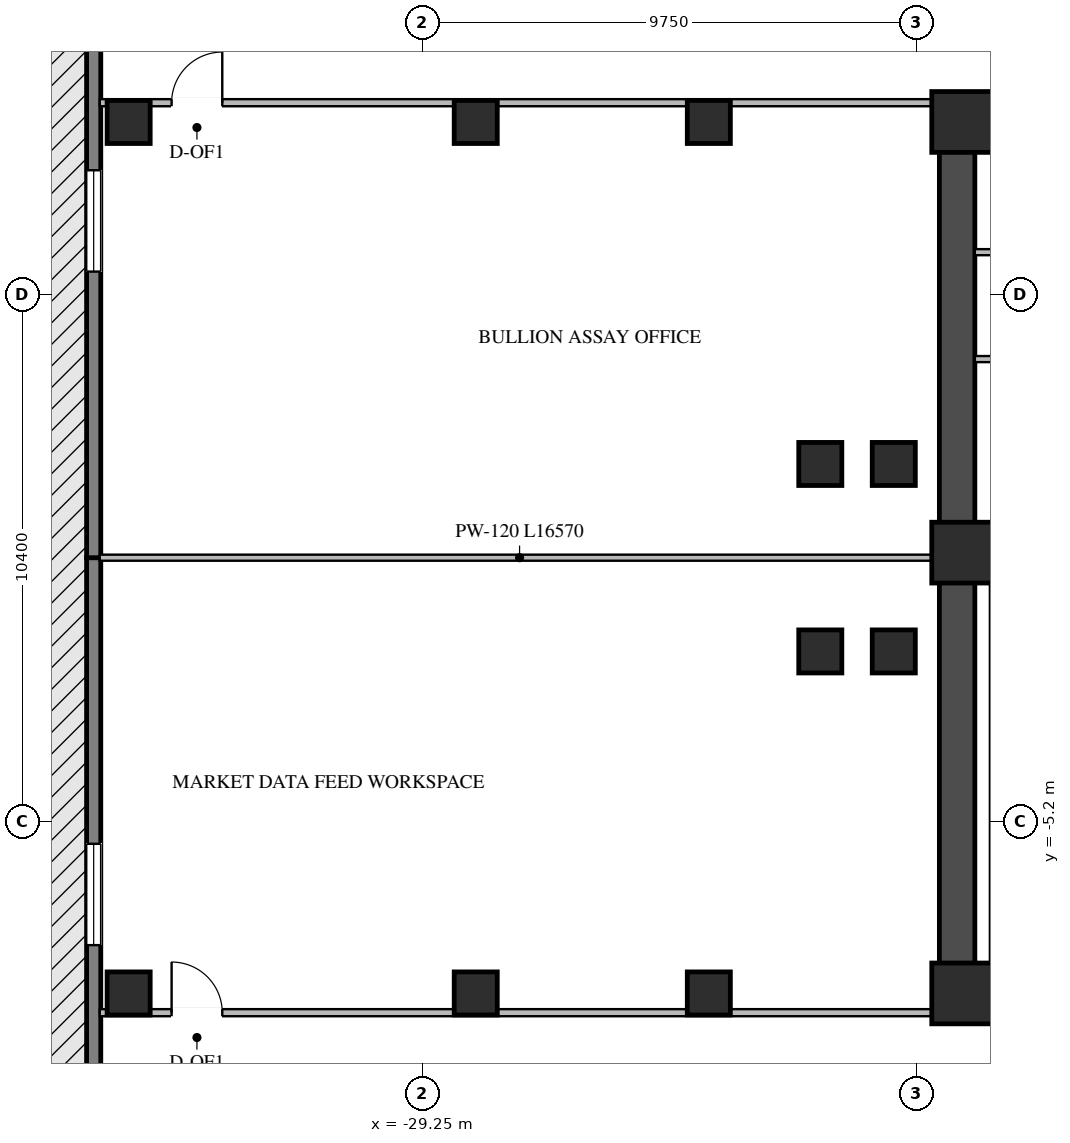
"""IFC4 building model, lengths in metres.
Left out: names, types, materials, properties, quantities, classifications, styles, units other than length and angle.
Written with IfcOpenShell. Run it as: python <this file> out.ifc"""

import sys

from ifc_helpers import new_model, si_unit, direction, frame, frame_2d, origin, origin_2d, place, context, subcontext, project, spatial, rectangle, i_section, extrude, element, fill, save


model = new_model("IFC4")
c1 = context("Model", 3, precision=1e-05, world=origin(), true_north=direction((0.0, 1.0)))
c2 = subcontext(c1, "Body", "Model", "MODEL_VIEW")
j1 = project(units=[si_unit("LENGTHUNIT", "METRE"), si_unit("PLANEANGLEUNIT", "RADIAN")], contexts=[c1])
p1 = place(None, origin())
s1 = spatial("IfcSite", under=j1, at=p1, CompositionType="ELEMENT")
p2 = place(p1, origin())
s2 = spatial("IfcBuilding", under=s1, at=p2, CompositionType="ELEMENT")
p3 = place(p2, frame((0.0, 0.0, 27.0)))
s3 = spatial("IfcBuildingStorey", under=s2, at=p3, CompositionType="ELEMENT", Elevation=27.0)
p4 = place(p3, frame((-19.05, -8.7, 0.0), z_axis=(0.0, 0.0, 1.0), x_axis=(1.0, 0.0, 0.0)))
e1 = element("IfcWall", 1, at=p4, inside=s3, PredefinedType="SHEAR", context=c2, shape_type="SweptSolid", body=[
    extrude(rectangle(XDim=10.25, YDim=0.7, at=frame_2d((5.125, 0.0))), origin(), (0.0, 0.0, 1.0), 4.02),
])
p5 = place(p3, frame((-19.05, 8.7, 0.0), z_axis=(0.0, 0.0, 1.0), x_axis=(1.0, 0.0, 0.0)))
e2 = element("IfcWall", 2, at=p5, inside=s3, PredefinedType="SHEAR", context=c2, shape_type="SweptSolid", body=[
    extrude(rectangle(XDim=10.25, YDim=0.7, at=frame_2d((5.125, 0.0))), origin(), (0.0, 0.0, 1.0), 4.02),
])
p6 = place(p5, frame((5.6, 0.0, 0.0)))
e3 = element("IfcOpeningElement", 3, at=p6, cuts=e2, PredefinedType="OPENING", context=c2, shape_type="SweptSolid", body=[
    extrude(rectangle(XDim=1.4, YDim=2.05, at=frame_2d((0.7, 1.025))), frame((0.0, 0.36, 0.0), z_axis=(0.0, -1.0, 0.0), x_axis=(1.0, 0.0, 0.0)), (0.0, 0.0, 1.0), 0.72),
])
p7 = place(p3, frame((-18.7, -8.35, 0.0), z_axis=(0.0, 0.0, 1.0), x_axis=(0.0, 1.0, 0.0)))
e4 = element("IfcWall", 4, at=p7, inside=s3, PredefinedType="SHEAR", context=c2, shape_type="SweptSolid", body=[
    extrude(rectangle(XDim=16.7, YDim=0.7, at=frame_2d((8.35, 0.0))), origin(), (0.0, 0.0, 1.0), 4.02),
])
for number, where, z_axis, x_axis in (
    (5, (-18.6, -8.6, 0.0), (0.0, 0.0, 1.0), (1.0, 0.0, 0.0)),
    (6, (-18.6, 0.1, 0.0), (0.0, 0.0, 1.0), (1.0, 0.0, 0.0)),
    (7, (-18.6, 8.6, 0.0), (0.0, 0.0, 1.0), (1.0, 0.0, 0.0)),
):
    element("IfcColumn", number, at=place(p3, frame(where, z_axis=z_axis, x_axis=x_axis)), inside=s3, PredefinedType="COLUMN", context=c2, shape_type="SweptSolid", body=[
        extrude(rectangle(XDim=1.2, YDim=1.2, at=origin_2d()), origin(), (0.0, 0.0, 1.0), 4.2),
    ])
for number, where, z_axis, x_axis in (
    (8, (-21.4, -1.85, 0.0), (0.0, 0.0, 1.0), (1.0, 0.0, 0.0)),
    (9, (-21.4, 1.85, 0.0), (0.0, 0.0, 1.0), (1.0, 0.0, 0.0)),
    (10, (-19.95, -1.85, 0.0), (0.0, 0.0, 1.0), (1.0, 0.0, 0.0)),
    (11, (-19.95, 1.85, 0.0), (0.0, 0.0, 1.0), (1.0, 0.0, 0.0)),
    (12, (-23.6, -8.6, 0.0), (0.0, 0.0, 1.0), (1.0, 0.0, 0.0)),
    (13, (-23.6, 8.6, 0.0), (0.0, 0.0, 1.0), (1.0, 0.0, 0.0)),
    (14, (-28.2, -8.6, 0.0), (0.0, 0.0, 1.0), (1.0, 0.0, 0.0)),
    (15, (-28.2, 8.6, 0.0), (0.0, 0.0, 1.0), (1.0, 0.0, 0.0)),
    (16, (-35.05, -8.6, 0.0), (0.0, 0.0, 1.0), (1.0, 0.0, 0.0)),
    (17, (-35.05, 8.6, 0.0), (0.0, 0.0, 1.0), (1.0, 0.0, 0.0)),
):
    element("IfcColumn", number, at=place(p3, frame(where, z_axis=z_axis, x_axis=x_axis)), inside=s3, PredefinedType="COLUMN", context=c2, shape_type="SweptSolid", body=[
        extrude(i_section(OverallWidth=0.85, OverallDepth=0.85, WebThickness=0.032, FlangeThickness=0.048, at=origin_2d()), origin(), (0.0, 0.0, 1.0), 4.2),
    ])
p8 = place(p3, frame((-35.74, -19.94, 0.0), z_axis=(0.0, 0.0, 1.0), x_axis=(0.0, 1.0, 0.0)))
e18 = element("IfcWall", 18, at=p8, inside=s3, PredefinedType="STANDARD", context=c2, shape_type="SweptSolid", body=[
    extrude(rectangle(XDim=19.94, YDim=0.28, at=frame_2d((9.97, 0.0))), origin(), (0.0, 0.0, 1.0), 4.0),
])
p9 = place(p8, frame((6.197, 0.0, 0.76)))
e19 = element("IfcOpeningElement", 19, at=p9, cuts=e18, PredefinedType="OPENING", context=c2, shape_type="SweptSolid", body=[
    extrude(rectangle(XDim=2.0, YDim=2.05, at=frame_2d((1.0, 1.025))), frame((0.0, 0.15, 0.0), z_axis=(0.0, -1.0, 0.0), x_axis=(1.0, 0.0, 0.0)), (0.0, 0.0, 1.0), 0.3),
])
p10 = place(p8, frame((12.293, 0.0, 0.76)))
e20 = element("IfcOpeningElement", 20, at=p10, cuts=e18, PredefinedType="OPENING", context=c2, shape_type="SweptSolid", body=[
    extrude(rectangle(XDim=2.0, YDim=2.05, at=frame_2d((1.0, 1.025))), frame((0.0, 0.15, 0.0), z_axis=(0.0, -1.0, 0.0), x_axis=(1.0, 0.0, 0.0)), (0.0, 0.0, 1.0), 0.3),
])
p11 = place(p3, frame((-35.74, 0.0, 0.0), z_axis=(0.0, 0.0, 1.0), x_axis=(0.0, 1.0, 0.0)))
e21 = element("IfcWall", 21, at=p11, inside=s3, PredefinedType="STANDARD", context=c2, shape_type="SweptSolid", body=[
    extrude(rectangle(XDim=19.94, YDim=0.28, at=frame_2d((9.97, 0.0))), origin(), (0.0, 0.0, 1.0), 4.0),
])
p12 = place(p11, frame((5.647, 0.0, 0.76)))
e22 = element("IfcOpeningElement", 22, at=p12, cuts=e21, PredefinedType="OPENING", context=c2, shape_type="SweptSolid", body=[
    extrude(rectangle(XDim=2.0, YDim=2.05, at=frame_2d((1.0, 1.025))), frame((0.0, 0.15, 0.0), z_axis=(0.0, -1.0, 0.0), x_axis=(1.0, 0.0, 0.0)), (0.0, 0.0, 1.0), 0.3),
])
p13 = place(p11, frame((11.743, 0.0, 0.76)))
e23 = element("IfcOpeningElement", 23, at=p13, cuts=e21, PredefinedType="OPENING", context=c2, shape_type="SweptSolid", body=[
    extrude(rectangle(XDim=2.0, YDim=2.05, at=frame_2d((1.0, 1.025))), frame((0.0, 0.15, 0.0), z_axis=(0.0, -1.0, 0.0), x_axis=(1.0, 0.0, 0.0)), (0.0, 0.0, 1.0), 0.3),
])
p14 = place(p3, frame((-18.35, 3.92, 0.0), z_axis=(0.0, 0.0, 1.0), x_axis=(1.0, 0.0, 0.0)))
e24 = element("IfcWall", 24, at=p14, inside=s3, PredefinedType="STANDARD", context=c2, shape_type="SweptSolid", body=[
    extrude(rectangle(XDim=4.45, YDim=0.12, at=frame_2d((2.225, 0.0))), origin(), (0.0, 0.0, 1.0), 4.0),
])
p15 = place(p3, frame((-18.35, 6.03, 0.0), z_axis=(0.0, 0.0, 1.0), x_axis=(1.0, 0.0, 0.0)))
e25 = element("IfcWall", 25, at=p15, inside=s3, PredefinedType="STANDARD", context=c2, shape_type="SweptSolid", body=[
    extrude(rectangle(XDim=2.2, YDim=0.12, at=frame_2d((1.1, 0.0))), origin(), (0.0, 0.0, 1.0), 4.0),
])
p16 = place(p3, frame((-35.62, 8.98, 0.0), z_axis=(0.0, 0.0, 1.0), x_axis=(1.0, 0.0, 0.0)))
e26 = element("IfcWall", 26, at=p16, inside=s3, PredefinedType="STANDARD", context=c2, shape_type="SweptSolid", body=[
    extrude(rectangle(XDim=16.57, YDim=0.14, at=frame_2d((8.285, 0.0))), origin(), (0.0, 0.0, 1.0), 4.0),
])
p17 = place(p16, frame((1.418, 0.0, 0.0)))
e27 = element("IfcOpeningElement", 27, at=p17, cuts=e26, PredefinedType="OPENING", context=c2, shape_type="SweptSolid", body=[
    extrude(rectangle(XDim=1.0, YDim=2.08, at=frame_2d((0.5, 1.04))), frame((0.0, 0.08, 0.0), z_axis=(0.0, -1.0, 0.0), x_axis=(1.0, 0.0, 0.0)), (0.0, 0.0, 1.0), 0.16),
])
p18 = place(p3, frame((-35.62, -8.98, 0.0), z_axis=(0.0, 0.0, 1.0), x_axis=(1.0, 0.0, 0.0)))
e28 = element("IfcWall", 28, at=p18, inside=s3, PredefinedType="STANDARD", context=c2, shape_type="SweptSolid", body=[
    extrude(rectangle(XDim=16.57, YDim=0.14, at=frame_2d((8.285, 0.0))), origin(), (0.0, 0.0, 1.0), 4.0),
])
p19 = place(p18, frame((1.418, 0.0, 0.0)))
e29 = element("IfcOpeningElement", 29, at=p19, cuts=e28, PredefinedType="OPENING", context=c2, shape_type="SweptSolid", body=[
    extrude(rectangle(XDim=1.0, YDim=2.08, at=frame_2d((0.5, 1.04))), frame((0.0, 0.08, 0.0), z_axis=(0.0, -1.0, 0.0), x_axis=(1.0, 0.0, 0.0)), (0.0, 0.0, 1.0), 0.16),
])
p20 = place(p3, frame((-35.62, 0.0, 0.0), z_axis=(0.0, 0.0, 1.0), x_axis=(1.0, 0.0, 0.0)))
e30 = element("IfcWall", 30, at=p20, inside=s3, PredefinedType="STANDARD", context=c2, shape_type="SweptSolid", body=[
    extrude(rectangle(XDim=16.57, YDim=0.12, at=frame_2d((8.285, 0.0))), origin(), (0.0, 0.0, 1.0), 3.495),
])
p21 = place(p10, origin())
e31 = element("IfcWindow", 31, at=p21, inside=s3, PartitioningType="DOUBLE_PANEL_VERTICAL", PredefinedType="WINDOW", context=c2, shape_type="SweptSolid", body=[
    extrude(rectangle(XDim=2.0, YDim=2.05, at=frame_2d((1.0, 1.025))), frame((0.0, 0.03, 0.0), z_axis=(0.0, -1.0, 0.0), x_axis=(1.0, 0.0, 0.0)), (0.0, 0.0, 1.0), 0.06),
])
fill(e20, e31)
p22 = place(p12, origin())
e32 = element("IfcWindow", 32, at=p22, inside=s3, PartitioningType="DOUBLE_PANEL_VERTICAL", PredefinedType="WINDOW", context=c2, shape_type="SweptSolid", body=[
    extrude(rectangle(XDim=2.0, YDim=2.05, at=frame_2d((1.0, 1.025))), frame((0.0, 0.03, 0.0), z_axis=(0.0, -1.0, 0.0), x_axis=(1.0, 0.0, 0.0)), (0.0, 0.0, 1.0), 0.06),
])
fill(e22, e32)
p23 = place(p17, origin())
e33 = element("IfcDoor", 33, at=p23, inside=s3, OperationType="SINGLE_SWING_RIGHT", PredefinedType="DOOR", context=c2, shape_type="SweptSolid", body=[
    extrude(rectangle(XDim=1.0, YDim=2.08, at=frame_2d((0.5, 1.04))), frame((0.0, 0.025, 0.0), z_axis=(0.0, -1.0, 0.0), x_axis=(1.0, 0.0, 0.0)), (0.0, 0.0, 1.0), 0.05),
])
fill(e27, e33)
p24 = place(p19, origin())
e34 = element("IfcDoor", 34, at=p24, inside=s3, OperationType="SINGLE_SWING_LEFT", PredefinedType="DOOR", context=c2, shape_type="SweptSolid", body=[
    extrude(rectangle(XDim=1.0, YDim=2.08, at=frame_2d((0.5, 1.04))), frame((0.0, 0.025, 0.0), z_axis=(0.0, -1.0, 0.0), x_axis=(1.0, 0.0, 0.0)), (0.0, 0.0, 1.0), 0.05),
])
fill(e29, e34)
save(model, sys.argv[1])
